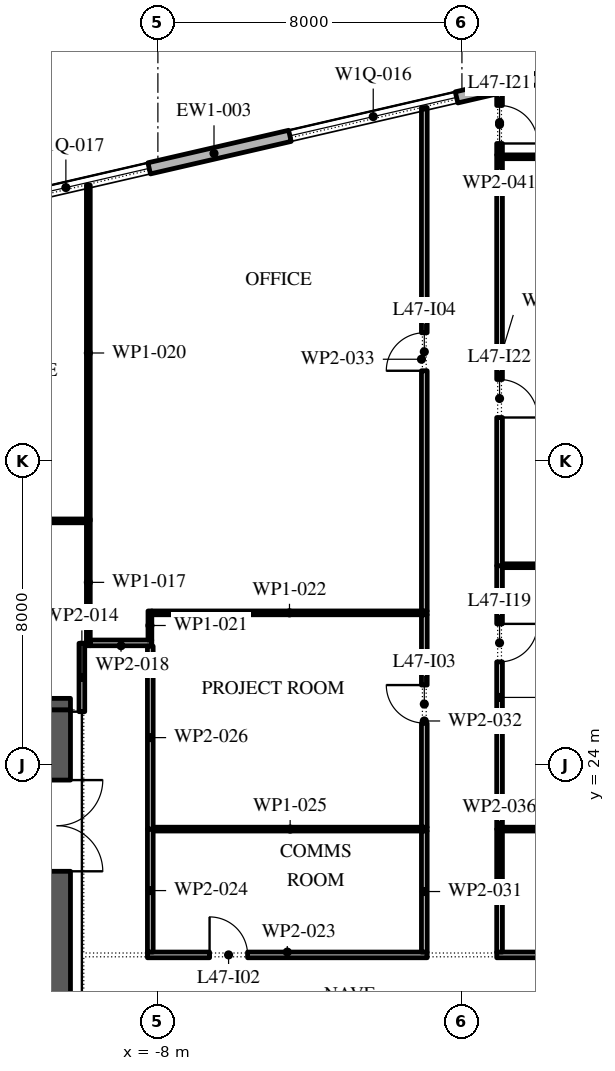
"""IFC4 building model, lengths in metres.
Left out: names, types, materials, properties, quantities, classifications, styles, units other than length and angle.
Written with IfcOpenShell. Run it as: python <this file> out.ifc"""

import sys

from ifc_helpers import new_model, si_unit, direction, frame, frame_2d, origin, place, context, subcontext, project, spatial, rectangle, extrude, element, fill, save


model = new_model("IFC4")
c1 = context("Model", 3, precision=1e-05, world=origin(), true_north=direction((0.0, 1.0)))
c2 = subcontext(c1, "Body", "Model", "MODEL_VIEW")
j1 = project(units=[si_unit("LENGTHUNIT", "METRE"), si_unit("PLANEANGLEUNIT", "RADIAN")], contexts=[c1])
p1 = place(None, origin())
s1 = spatial("IfcSite", under=j1, at=p1, CompositionType="ELEMENT")
p2 = place(p1, origin())
s2 = spatial("IfcBuilding", under=s1, at=p2, CompositionType="ELEMENT")
p3 = place(p2, frame((0.0, 0.0, 213.6)))
s3 = spatial("IfcBuildingStorey", under=s2, at=p3, CompositionType="ELEMENT", Elevation=213.6)
p4 = place(p3, frame((17.592, 45.657, 0.0), z_axis=(0.0, 0.0, 1.0), x_axis=(-0.974370243697, -0.224950279389, 0.0)))
e1 = element("IfcWall", 1, at=p4, inside=s3, PredefinedType="STANDARD", context=c2, shape_type="SweptSolid", body=[
    extrude(rectangle(XDim=49.5, YDim=0.3, at=frame_2d((24.75, 0.0))), origin(), (0.0, 0.0, 1.0), 4.0),
])
p5 = place(p4, frame((3.6, 0.0, 0.0)))
e2 = element("IfcOpeningElement", 2, at=p5, cuts=e1, PredefinedType="OPENING", context=c2, shape_type="SweptSolid", body=[
    extrude(rectangle(XDim=2.4, YDim=3.5, at=frame_2d((1.2, 1.75))), frame((0.0, 0.16, 0.0), z_axis=(0.0, -1.0, 0.0), x_axis=(1.0, 0.0, 0.0)), (0.0, 0.0, 1.0), 0.32),
])
p6 = place(p4, frame((9.9, 0.0, 0.45)))
e3 = element("IfcOpeningElement", 3, at=p6, cuts=e1, PredefinedType="OPENING", context=c2, shape_type="SweptSolid", body=[
    extrude(rectangle(XDim=4.5, YDim=2.45, at=frame_2d((2.25, 1.225))), frame((0.0, 0.16, 0.0), z_axis=(0.0, -1.0, 0.0), x_axis=(1.0, 0.0, 0.0)), (0.0, 0.0, 1.0), 0.32),
])
p7 = place(p4, frame((18.2, 0.0, 0.45)))
e4 = element("IfcOpeningElement", 4, at=p7, cuts=e1, PredefinedType="OPENING", context=c2, shape_type="SweptSolid", body=[
    extrude(rectangle(XDim=4.5, YDim=2.45, at=frame_2d((2.25, 1.225))), frame((0.0, 0.16, 0.0), z_axis=(0.0, -1.0, 0.0), x_axis=(1.0, 0.0, 0.0)), (0.0, 0.0, 1.0), 0.32),
])
p8 = place(p4, frame((26.5, 0.0, 0.45)))
e5 = element("IfcOpeningElement", 5, at=p8, cuts=e1, PredefinedType="OPENING", context=c2, shape_type="SweptSolid", body=[
    extrude(rectangle(XDim=4.5, YDim=2.45, at=frame_2d((2.25, 1.225))), frame((0.0, 0.16, 0.0), z_axis=(0.0, -1.0, 0.0), x_axis=(1.0, 0.0, 0.0)), (0.0, 0.0, 1.0), 0.32),
])
p9 = place(p4, frame((35.85, 0.0, 0.0)))
e6 = element("IfcOpeningElement", 6, at=p9, cuts=e1, PredefinedType="OPENING", context=c2, shape_type="SweptSolid", body=[
    extrude(rectangle(XDim=2.4, YDim=3.5, at=frame_2d((1.2, 1.75))), frame((0.0, 0.16, 0.0), z_axis=(0.0, -1.0, 0.0), x_axis=(1.0, 0.0, 0.0)), (0.0, 0.0, 1.0), 0.32),
])
p10 = place(p4, frame((43.1, 0.0, 0.45)))
e7 = element("IfcOpeningElement", 7, at=p10, cuts=e1, PredefinedType="OPENING", context=c2, shape_type="SweptSolid", body=[
    extrude(rectangle(XDim=4.5, YDim=2.575, at=frame_2d((2.25, 1.288))), frame((0.0, 0.16, 0.0), z_axis=(0.0, -1.0, 0.0), x_axis=(1.0, 0.0, 0.0)), (0.0, 0.0, 1.0), 0.32),
])
p11 = place(p3, frame((-10.65, -2.45, 0.0), z_axis=(0.0, 0.0, 1.0), x_axis=(0.0, 1.0, 0.0)))
e8 = element("IfcWall", 8, at=p11, inside=s3, PredefinedType="SHEAR", context=c2, shape_type="SweptSolid", body=[
    extrude(rectangle(XDim=27.9, YDim=0.7, at=frame_2d((13.95, 0.0))), origin(), (0.0, 0.0, 1.0), 4.0),
])
p12 = place(p11, frame((23.65, 0.0, 0.0)))
e9 = element("IfcOpeningElement", 9, at=p12, cuts=e8, PredefinedType="OPENING", context=c2, shape_type="SweptSolid", body=[
    extrude(rectangle(XDim=2.4, YDim=2.1, at=frame_2d((1.2, 1.05))), frame((0.0, 0.36, 0.0), z_axis=(0.0, -1.0, 0.0), x_axis=(1.0, 0.0, 0.0)), (0.0, 0.0, 1.0), 0.72),
])
p13 = place(p11, frame((0.788, 0.0, 0.0)))
e10 = element("IfcOpeningElement", 10, at=p13, cuts=e8, PredefinedType="OPENING", context=c2, shape_type="SweptSolid", body=[
    extrude(rectangle(XDim=0.9, YDim=2.1, at=frame_2d((0.45, 1.05))), frame((0.0, 0.36, 0.0), z_axis=(0.0, -1.0, 0.0), x_axis=(1.0, 0.0, 0.0)), (0.0, 0.0, 1.0), 0.72),
])
p14 = place(p11, frame((3.962, 0.0, 0.0)))
e11 = element("IfcOpeningElement", 11, at=p14, cuts=e8, PredefinedType="OPENING", context=c2, shape_type="SweptSolid", body=[
    extrude(rectangle(XDim=1.0, YDim=2.1, at=frame_2d((0.5, 1.05))), frame((0.0, 0.36, 0.0), z_axis=(0.0, -1.0, 0.0), x_axis=(1.0, 0.0, 0.0)), (0.0, 0.0, 1.0), 0.72),
])
p15 = place(p3, frame((-21.7, 25.6, 0.0), z_axis=(0.0, 0.0, 1.0), x_axis=(1.0, 0.0, 0.0)))
e12 = element("IfcWall", 12, at=p15, inside=s3, PredefinedType="SHEAR", context=c2, shape_type="SweptSolid", body=[
    extrude(rectangle(XDim=11.4, YDim=0.3, at=frame_2d((5.7, 0.0))), origin(), (0.0, 0.0, 1.0), 4.0),
])
p16 = place(p3, frame((-10.0, 25.4, 0.0), z_axis=(0.0, 0.0, 1.0), x_axis=(0.0, 1.0, 0.0)))
e13 = element("IfcWall", 13, at=p16, inside=s3, PredefinedType="PARTITIONING", context=c2, shape_type="SweptSolid", body=[
    extrude(rectangle(XDim=1.8, YDim=0.15, at=frame_2d((0.9, 0.0))), origin(), (0.0, 0.0, 1.0), 4.0),
])
p17 = place(p3, frame((-9.83, 27.135, 0.0), z_axis=(0.0, 0.0, 1.0), x_axis=(0.0, 1.0, 0.0)))
e14 = element("IfcWall", 14, at=p17, inside=s3, PredefinedType="PARTITIONING", context=c2, shape_type="SweptSolid", body=[
    extrude(rectangle(XDim=3.335, YDim=0.1, at=frame_2d((1.667, 0.0))), origin(), (0.0, 0.0, 1.0), 4.0),
])
p18 = place(p3, frame((-9.78, 27.21, 0.0), z_axis=(0.0, 0.0, 1.0), x_axis=(1.0, 0.0, 0.0)))
e15 = element("IfcWall", 15, at=p18, inside=s3, PredefinedType="PARTITIONING", context=c2, shape_type="SweptSolid", body=[
    extrude(rectangle(XDim=1.62, YDim=0.15, at=frame_2d((0.81, 0.0))), origin(), (0.0, 0.0, 1.0), 4.0),
])
p19 = place(p3, frame((-9.88, 30.42, 0.0), z_axis=(0.0, 0.0, 1.0), x_axis=(-1.0, 0.0, 0.0)))
e16 = element("IfcWall", 16, at=p19, inside=s3, PredefinedType="PARTITIONING", context=c2, shape_type="SweptSolid", body=[
    extrude(rectangle(XDim=12.59, YDim=0.1, at=frame_2d((6.295, 0.0))), origin(), (0.0, 0.0, 1.0), 4.0),
])
p20 = place(p3, frame((-9.83, 30.42, 0.0), z_axis=(0.0, 0.0, 1.0), x_axis=(0.0, 1.0, 0.0)))
e17 = element("IfcWall", 17, at=p20, inside=s3, PredefinedType="PARTITIONING", context=c2, shape_type="SweptSolid", body=[
    extrude(rectangle(XDim=8.835, YDim=0.1, at=frame_2d((4.417, 0.0))), origin(), (0.0, 0.0, 1.0), 4.0),
])
p21 = place(p3, frame((-8.21, 27.285, 0.0), z_axis=(0.0, 0.0, 1.0), x_axis=(0.0, 1.0, 0.0)))
e18 = element("IfcWall", 18, at=p21, inside=s3, PredefinedType="PARTITIONING", context=c2, shape_type="SweptSolid", body=[
    extrude(rectangle(XDim=0.765, YDim=0.1, at=frame_2d((0.383, 0.0))), origin(), (0.0, 0.0, 1.0), 4.0),
])
p22 = place(p3, frame((-8.16, 28.0, 0.0), z_axis=(0.0, 0.0, 1.0), x_axis=(1.0, 0.0, 0.0)))
e19 = element("IfcWall", 19, at=p22, inside=s3, PredefinedType="PARTITIONING", context=c2, shape_type="SweptSolid", body=[
    extrude(rectangle(XDim=7.245, YDim=0.1, at=frame_2d((3.623, 0.0))), origin(), (0.0, 0.0, 1.0), 4.0),
])
p23 = place(p3, frame((-8.275, 19.0, 0.0), z_axis=(0.0, 0.0, 1.0), x_axis=(1.0, 0.0, 0.0)))
e20 = element("IfcWall", 20, at=p23, inside=s3, PredefinedType="PARTITIONING", context=c2, shape_type="SweptSolid", body=[
    extrude(rectangle(XDim=7.36, YDim=0.15, at=frame_2d((3.68, 0.0))), origin(), (0.0, 0.0, 1.0), 4.0),
])
p24 = place(p23, frame((1.635, 0.0, 0.0)))
e21 = element("IfcOpeningElement", 21, at=p24, cuts=e20, PredefinedType="OPENING", context=c2, shape_type="SweptSolid", body=[
    extrude(rectangle(XDim=1.0, YDim=2.1, at=frame_2d((0.5, 1.05))), frame((0.0, 0.085, 0.0), z_axis=(0.0, -1.0, 0.0), x_axis=(1.0, 0.0, 0.0)), (0.0, 0.0, 1.0), 0.17),
])
p25 = place(p3, frame((-8.2, 22.31, 0.0), z_axis=(0.0, 0.0, 1.0), x_axis=(0.0, -1.0, 0.0)))
e22 = element("IfcWall", 22, at=p25, inside=s3, PredefinedType="PARTITIONING", context=c2, shape_type="SweptSolid", body=[
    extrude(rectangle(XDim=3.235, YDim=0.15, at=frame_2d((1.618, 0.0))), origin(), (0.0, 0.0, 1.0), 4.0),
])
p26 = place(p3, frame((-8.125, 22.31, 0.0), z_axis=(0.0, 0.0, 1.0), x_axis=(1.0, 0.0, 0.0)))
e23 = element("IfcWall", 23, at=p26, inside=s3, PredefinedType="PARTITIONING", context=c2, shape_type="SweptSolid", body=[
    extrude(rectangle(XDim=7.21, YDim=0.1, at=frame_2d((3.605, 0.0))), origin(), (0.0, 0.0, 1.0), 4.0),
])
p27 = place(p3, frame((-8.2, 27.125, 0.0), z_axis=(0.0, 0.0, 1.0), x_axis=(0.0, -1.0, 0.0)))
e24 = element("IfcWall", 24, at=p27, inside=s3, PredefinedType="PARTITIONING", context=c2, shape_type="SweptSolid", body=[
    extrude(rectangle(XDim=4.815, YDim=0.15, at=frame_2d((2.407, 0.0))), origin(), (0.0, 0.0, 1.0), 4.0),
])
p28 = place(p3, frame((-0.99, 19.075, 0.0), z_axis=(0.0, 0.0, 1.0), x_axis=(0.0, 1.0, 0.0)))
e25 = element("IfcWall", 25, at=p28, inside=s3, PredefinedType="PARTITIONING", context=c2, shape_type="SweptSolid", body=[
    extrude(rectangle(XDim=3.185, YDim=0.15, at=frame_2d((1.593, 0.0))), origin(), (0.0, 0.0, 1.0), 4.0),
])
p29 = place(p3, frame((-0.99, 22.36, 0.0), z_axis=(0.0, 0.0, 1.0), x_axis=(0.0, 1.0, 0.0)))
e26 = element("IfcWall", 26, at=p29, inside=s3, PredefinedType="PARTITIONING", context=c2, shape_type="SweptSolid", body=[
    extrude(rectangle(XDim=5.59, YDim=0.15, at=frame_2d((2.795, 0.0))), origin(), (0.0, 0.0, 1.0), 4.0),
])
p30 = place(p29, frame((2.74, 0.0, 0.0)))
e27 = element("IfcOpeningElement", 27, at=p30, cuts=e26, PredefinedType="OPENING", context=c2, shape_type="SweptSolid", body=[
    extrude(rectangle(XDim=1.0, YDim=2.1, at=frame_2d((0.5, 1.05))), frame((0.0, 0.085, 0.0), z_axis=(0.0, -1.0, 0.0), x_axis=(1.0, 0.0, 0.0)), (0.0, 0.0, 1.0), 0.17),
])
p31 = place(p3, frame((-0.99, 28.05, 0.0), z_axis=(0.0, 0.0, 1.0), x_axis=(0.0, 1.0, 0.0)))
e28 = element("IfcWall", 28, at=p31, inside=s3, PredefinedType="PARTITIONING", context=c2, shape_type="SweptSolid", body=[
    extrude(rectangle(XDim=13.246, YDim=0.15, at=frame_2d((6.623, 0.0))), origin(), (0.0, 0.0, 1.0), 4.0),
])
p32 = place(p31, frame((6.32, 0.0, 0.0)))
e29 = element("IfcOpeningElement", 29, at=p32, cuts=e28, PredefinedType="OPENING", context=c2, shape_type="SweptSolid", body=[
    extrude(rectangle(XDim=1.0, YDim=2.1, at=frame_2d((0.5, 1.05))), frame((0.0, 0.085, 0.0), z_axis=(0.0, -1.0, 0.0), x_axis=(1.0, 0.0, 0.0)), (0.0, 0.0, 1.0), 0.17),
])
p33 = place(p3, frame((0.915, 19.0, 0.0), z_axis=(0.0, 0.0, 1.0), x_axis=(1.0, 0.0, 0.0)))
e30 = element("IfcWall", 30, at=p33, inside=s3, PredefinedType="PARTITIONING", context=c2, shape_type="SweptSolid", body=[
    extrude(rectangle(XDim=7.36, YDim=0.15, at=frame_2d((3.68, 0.0))), origin(), (0.0, 0.0, 1.0), 4.0),
])
p34 = place(p33, frame((2.385, 0.0, 0.0)))
e31 = element("IfcOpeningElement", 31, at=p34, cuts=e30, PredefinedType="OPENING", context=c2, shape_type="SweptSolid", body=[
    extrude(rectangle(XDim=1.0, YDim=2.1, at=frame_2d((0.5, 1.05))), frame((0.0, 0.085, 0.0), z_axis=(0.0, -1.0, 0.0), x_axis=(1.0, 0.0, 0.0)), (0.0, 0.0, 1.0), 0.17),
])
p35 = place(p3, frame((0.99, 22.31, 0.0), z_axis=(0.0, 0.0, 1.0), x_axis=(0.0, -1.0, 0.0)))
e32 = element("IfcWall", 32, at=p35, inside=s3, PredefinedType="PARTITIONING", context=c2, shape_type="SweptSolid", body=[
    extrude(rectangle(XDim=3.235, YDim=0.15, at=frame_2d((1.618, 0.0))), origin(), (0.0, 0.0, 1.0), 4.0),
])
p36 = place(p3, frame((1.065, 22.31, 0.0), z_axis=(0.0, 0.0, 1.0), x_axis=(1.0, 0.0, 0.0)))
e33 = element("IfcWall", 33, at=p36, inside=s3, PredefinedType="PARTITIONING", context=c2, shape_type="SweptSolid", body=[
    extrude(rectangle(XDim=7.21, YDim=0.1, at=frame_2d((3.605, 0.0))), origin(), (0.0, 0.0, 1.0), 4.0),
])
p37 = place(p3, frame((0.99, 29.24, 0.0), z_axis=(0.0, 0.0, 1.0), x_axis=(0.0, -1.0, 0.0)))
e34 = element("IfcWall", 34, at=p37, inside=s3, PredefinedType="PARTITIONING", context=c2, shape_type="SweptSolid", body=[
    extrude(rectangle(XDim=6.93, YDim=0.15, at=frame_2d((3.465, 0.0))), origin(), (0.0, 0.0, 1.0), 4.0),
])
p38 = place(p37, frame((1.53, 0.0, 0.0)))
e35 = element("IfcOpeningElement", 35, at=p38, cuts=e34, PredefinedType="OPENING", context=c2, shape_type="SweptSolid", body=[
    extrude(rectangle(XDim=1.0, YDim=2.1, at=frame_2d((0.5, 1.05))), frame((0.0, 0.085, 0.0), z_axis=(0.0, -1.0, 0.0), x_axis=(1.0, 0.0, 0.0)), (0.0, 0.0, 1.0), 0.17),
])
p39 = place(p3, frame((1.065, 29.24, 0.0), z_axis=(0.0, 0.0, 1.0), x_axis=(1.0, 0.0, 0.0)))
e36 = element("IfcWall", 36, at=p39, inside=s3, PredefinedType="PARTITIONING", context=c2, shape_type="SweptSolid", body=[
    extrude(rectangle(XDim=7.145, YDim=0.1, at=frame_2d((3.573, 0.0))), origin(), (0.0, 0.0, 1.0), 4.0),
])
p40 = place(p3, frame((0.99, 40.05, 0.0), z_axis=(0.0, 0.0, 1.0), x_axis=(0.0, -1.0, 0.0)))
e37 = element("IfcWall", 37, at=p40, inside=s3, PredefinedType="PARTITIONING", context=c2, shape_type="SweptSolid", body=[
    extrude(rectangle(XDim=10.81, YDim=0.15, at=frame_2d((5.405, 0.0))), origin(), (0.0, 0.0, 1.0), 4.0),
])
p41 = place(p40, frame((5.91, 0.0, 0.0)))
e38 = element("IfcOpeningElement", 38, at=p41, cuts=e37, PredefinedType="OPENING", context=c2, shape_type="SweptSolid", body=[
    extrude(rectangle(XDim=1.0, YDim=2.1, at=frame_2d((0.5, 1.05))), frame((0.0, 0.085, 0.0), z_axis=(0.0, -1.0, 0.0), x_axis=(1.0, 0.0, 0.0)), (0.0, 0.0, 1.0), 0.17),
])
p42 = place(p3, frame((0.99, 41.753, 0.0), z_axis=(0.0, 0.0, 1.0), x_axis=(0.0, -1.0, 0.0)))
e39 = element("IfcWall", 39, at=p42, inside=s3, PredefinedType="PARTITIONING", context=c2, shape_type="SweptSolid", body=[
    extrude(rectangle(XDim=1.703, YDim=0.15, at=frame_2d((0.852, 0.0))), origin(), (0.0, 0.0, 1.0), 4.0),
])
p43 = place(p42, frame((0.403, 0.0, 0.0)))
e40 = element("IfcOpeningElement", 40, at=p43, cuts=e39, PredefinedType="OPENING", context=c2, shape_type="SweptSolid", body=[
    extrude(rectangle(XDim=1.0, YDim=2.1, at=frame_2d((0.5, 1.05))), frame((0.0, 0.085, 0.0), z_axis=(0.0, -1.0, 0.0), x_axis=(1.0, 0.0, 0.0)), (0.0, 0.0, 1.0), 0.17),
])
p44 = place(p3, frame((14.48, 40.0, 0.0), z_axis=(0.0, 0.0, 1.0), x_axis=(-1.0, 0.0, 0.0)))
e41 = element("IfcWall", 41, at=p44, inside=s3, PredefinedType="PARTITIONING", context=c2, shape_type="SweptSolid", body=[
    extrude(rectangle(XDim=13.415, YDim=0.1, at=frame_2d((6.708, 0.0))), origin(), (0.0, 0.0, 1.0), 4.0),
])
p45 = place(p7, origin())
e42 = element("IfcWindow", 42, at=p45, inside=s3, PartitioningType="DOUBLE_PANEL_VERTICAL", PredefinedType="WINDOW", context=c2, shape_type="SweptSolid", body=[
    extrude(rectangle(XDim=4.5, YDim=2.45, at=frame_2d((2.25, 1.225))), frame((0.0, 0.03, 0.0), z_axis=(0.0, -1.0, 0.0), x_axis=(1.0, 0.0, 0.0)), (0.0, 0.0, 1.0), 0.06),
])
fill(e4, e42)
p46 = place(p8, origin())
e43 = element("IfcWindow", 43, at=p46, inside=s3, PartitioningType="DOUBLE_PANEL_VERTICAL", PredefinedType="WINDOW", context=c2, shape_type="SweptSolid", body=[
    extrude(rectangle(XDim=4.5, YDim=2.45, at=frame_2d((2.25, 1.225))), frame((0.0, 0.03, 0.0), z_axis=(0.0, -1.0, 0.0), x_axis=(1.0, 0.0, 0.0)), (0.0, 0.0, 1.0), 0.06),
])
fill(e5, e43)
p47 = place(p12, frame((2.4, 0.0, 0.0), z_axis=(0.0, 0.0, 1.0), x_axis=(-1.0, 0.0, 0.0)))
e44 = element("IfcDoor", 44, at=p47, inside=s3, OperationType="DOUBLE_DOOR_SINGLE_SWING", PredefinedType="DOOR", context=c2, shape_type="SweptSolid", body=[
    extrude(rectangle(XDim=2.4, YDim=2.1, at=frame_2d((1.2, 1.05))), frame((0.0, 0.025, 0.0), z_axis=(0.0, -1.0, 0.0), x_axis=(1.0, 0.0, 0.0)), (0.0, 0.0, 1.0), 0.05),
])
fill(e9, e44)
p48 = place(p24, origin())
e45 = element("IfcDoor", 45, at=p48, inside=s3, OperationType="SINGLE_SWING_RIGHT", PredefinedType="DOOR", context=c2, shape_type="SweptSolid", body=[
    extrude(rectangle(XDim=1.0, YDim=2.1, at=frame_2d((0.5, 1.05))), frame((0.0, 0.025, 0.0), z_axis=(0.0, -1.0, 0.0), x_axis=(1.0, 0.0, 0.0)), (0.0, 0.0, 1.0), 0.05),
])
fill(e21, e45)
p49 = place(p30, origin())
e46 = element("IfcDoor", 46, at=p49, inside=s3, OperationType="SINGLE_SWING_LEFT", PredefinedType="DOOR", context=c2, shape_type="SweptSolid", body=[
    extrude(rectangle(XDim=1.0, YDim=2.1, at=frame_2d((0.5, 1.05))), frame((0.0, 0.025, 0.0), z_axis=(0.0, -1.0, 0.0), x_axis=(1.0, 0.0, 0.0)), (0.0, 0.0, 1.0), 0.05),
])
fill(e27, e46)
p50 = place(p32, origin())
e47 = element("IfcDoor", 47, at=p50, inside=s3, OperationType="SINGLE_SWING_RIGHT", PredefinedType="DOOR", context=c2, shape_type="SweptSolid", body=[
    extrude(rectangle(XDim=1.0, YDim=2.1, at=frame_2d((0.5, 1.05))), frame((0.0, 0.025, 0.0), z_axis=(0.0, -1.0, 0.0), x_axis=(1.0, 0.0, 0.0)), (0.0, 0.0, 1.0), 0.05),
])
fill(e29, e47)
p51 = place(p38, origin())
e48 = element("IfcDoor", 48, at=p51, inside=s3, OperationType="SINGLE_SWING_RIGHT", PredefinedType="DOOR", context=c2, shape_type="SweptSolid", body=[
    extrude(rectangle(XDim=1.0, YDim=2.1, at=frame_2d((0.5, 1.05))), frame((0.0, 0.025, 0.0), z_axis=(0.0, -1.0, 0.0), x_axis=(1.0, 0.0, 0.0)), (0.0, 0.0, 1.0), 0.05),
])
fill(e35, e48)
p52 = place(p43, origin())
e49 = element("IfcDoor", 49, at=p52, inside=s3, OperationType="SINGLE_SWING_LEFT", PredefinedType="DOOR", context=c2, shape_type="SweptSolid", body=[
    extrude(rectangle(XDim=1.0, YDim=2.1, at=frame_2d((0.5, 1.05))), frame((0.0, 0.025, 0.0), z_axis=(0.0, -1.0, 0.0), x_axis=(1.0, 0.0, 0.0)), (0.0, 0.0, 1.0), 0.05),
])
fill(e40, e49)
p53 = place(p41, origin())
e50 = element("IfcDoor", 50, at=p53, inside=s3, OperationType="SINGLE_SWING_LEFT", PredefinedType="DOOR", context=c2, shape_type="SweptSolid", body=[
    extrude(rectangle(XDim=1.0, YDim=2.1, at=frame_2d((0.5, 1.05))), frame((0.0, 0.025, 0.0), z_axis=(0.0, -1.0, 0.0), x_axis=(1.0, 0.0, 0.0)), (0.0, 0.0, 1.0), 0.05),
])
fill(e38, e50)
save(model, sys.argv[1])
